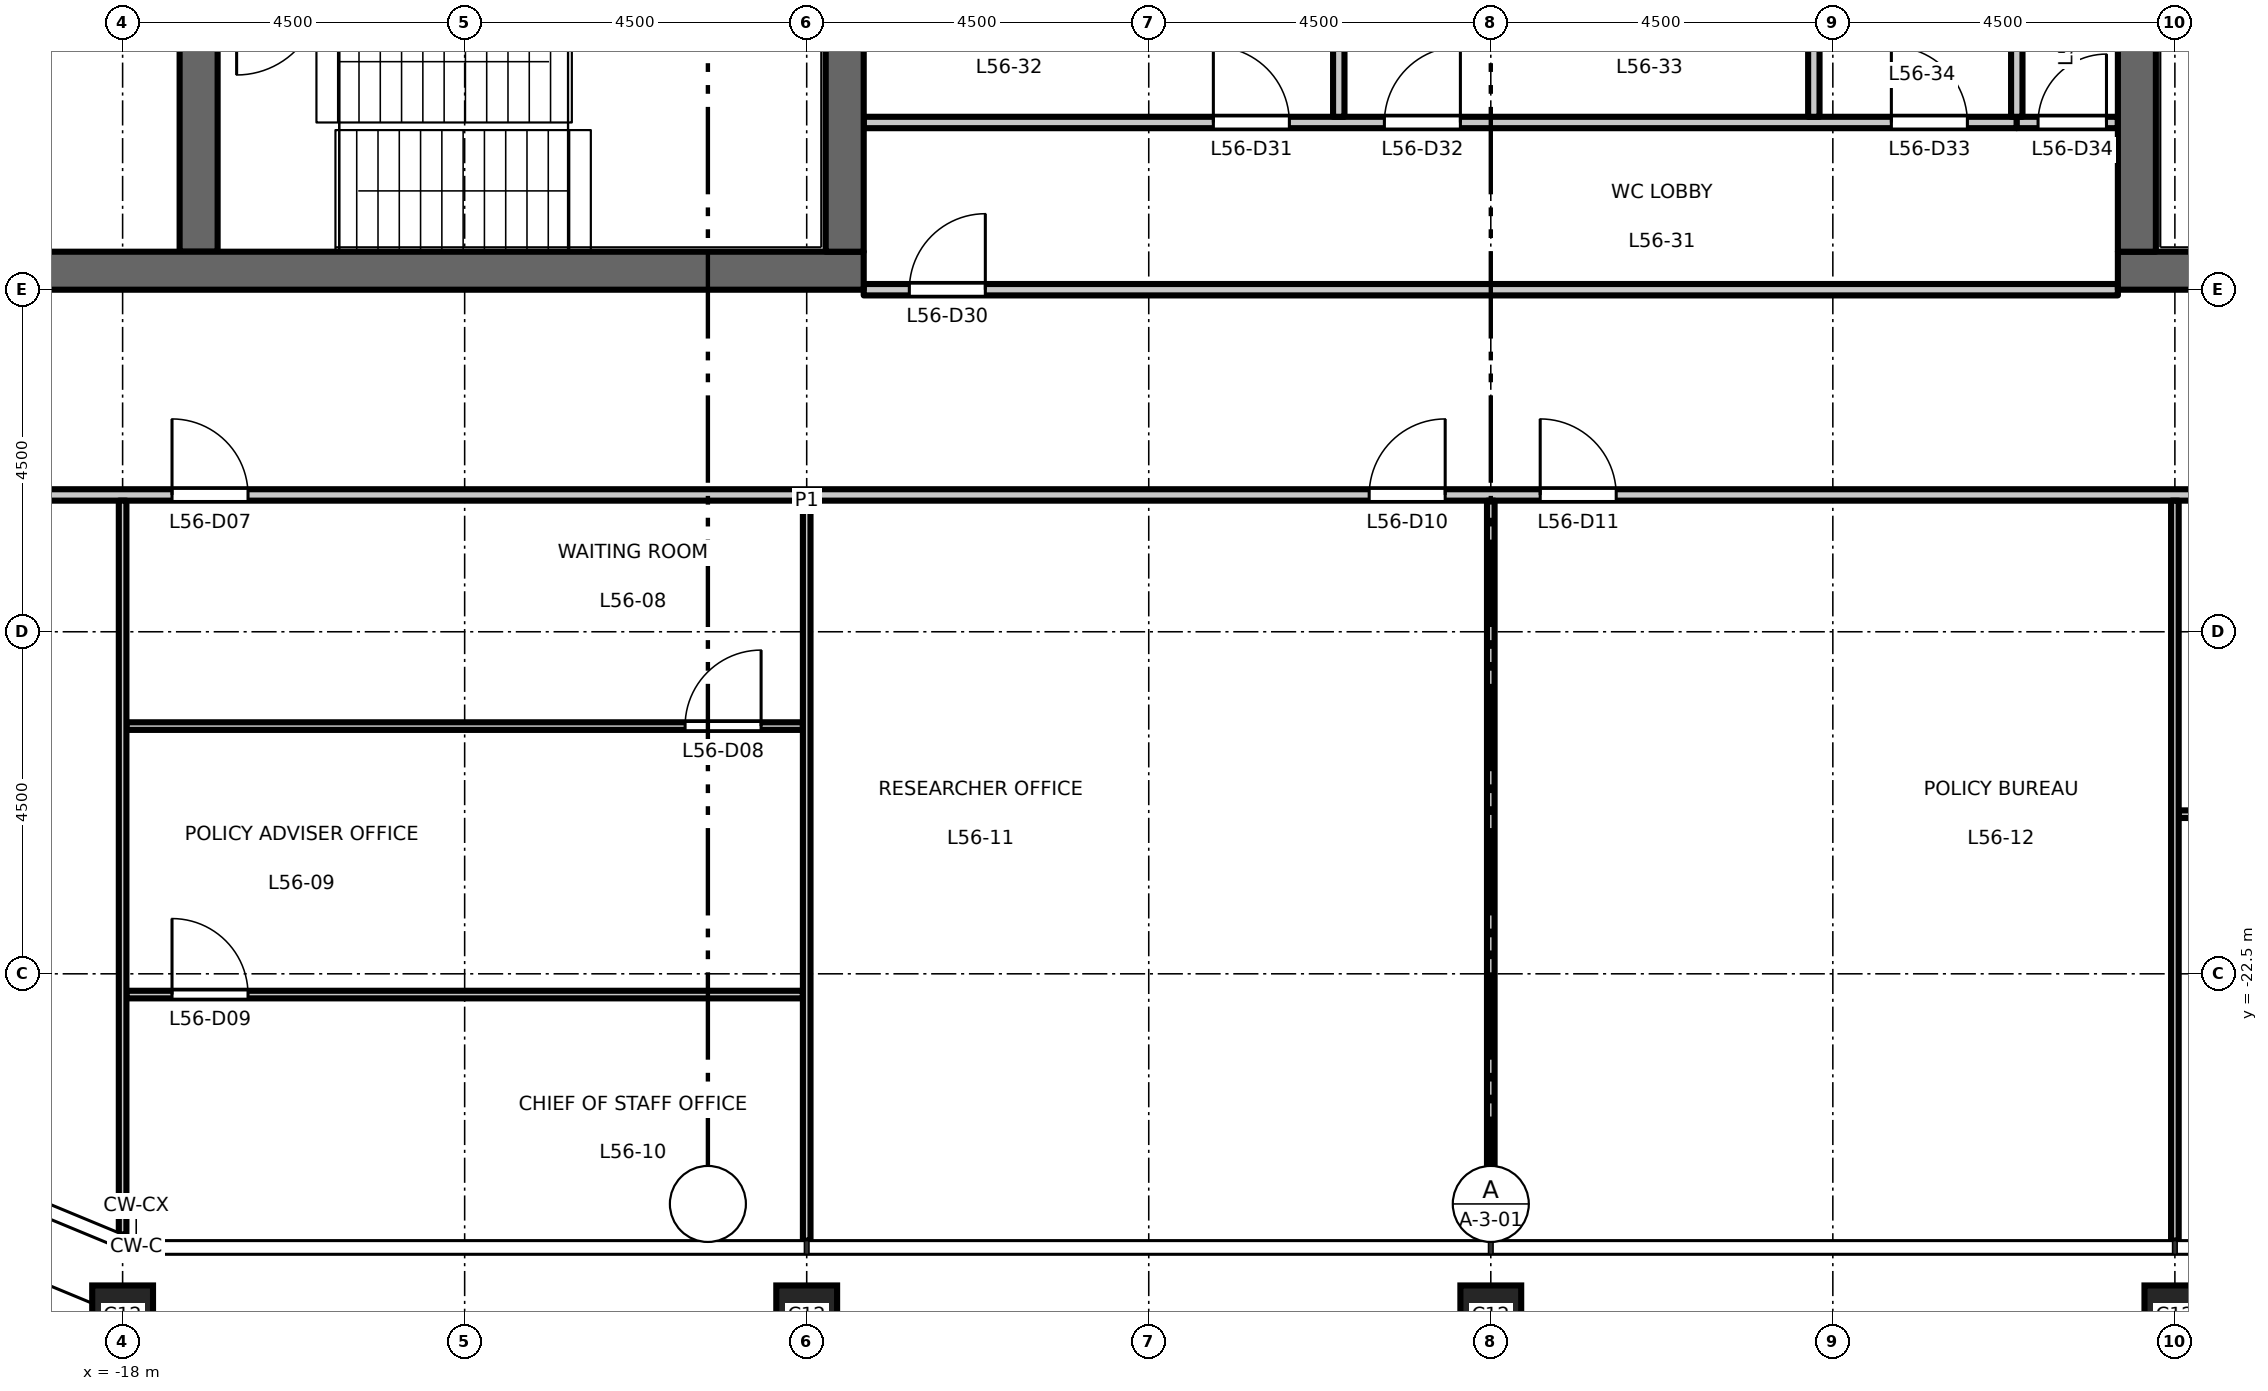
"""IFC4 building model, lengths in metres.
Left out: names, types, materials, properties, quantities, classifications, styles, units other than length and angle.
Written with IfcOpenShell. Run it as: python <this file> out.ifc"""

import sys

from ifc_helpers import new_model, si_unit, direction, frame, frame_2d, origin, origin_2d, place, context, subcontext, project, spatial, rectangle, hollow_rectangle, extrude, element, fill, save


model = new_model("IFC4")
c1 = context("Model", 3, precision=1e-05, world=origin(), true_north=direction((0.0, 1.0)))
c2 = subcontext(c1, "Body", "Model", "MODEL_VIEW")
j1 = project(units=[si_unit("LENGTHUNIT", "METRE"), si_unit("PLANEANGLEUNIT", "RADIAN")], contexts=[c1])
p1 = place(None, origin())
s1 = spatial("IfcSite", under=j1, at=p1, CompositionType="ELEMENT")
p2 = place(p1, origin())
s2 = spatial("IfcBuilding", under=s1, at=p2, CompositionType="ELEMENT")
p3 = place(p2, frame((0.0, 0.0, 260.2)))
s3 = spatial("IfcBuildingStorey", under=s2, at=p3, CompositionType="ELEMENT", Elevation=260.2)
for number, where, z_axis, x_axis in (
    (1, (-18.0, -27.0, 0.0), (0.0, 0.0, 1.0), (1.0, 0.0, 0.0)),
    (2, (-9.0, -27.0, 0.0), (0.0, 0.0, 1.0), (1.0, 0.0, 0.0)),
    (3, (0.0, -27.0, 0.0), (0.0, 0.0, 1.0), (1.0, 0.0, 0.0)),
    (4, (9.0, -27.0, 0.0), (0.0, 0.0, 1.0), (1.0, 0.0, 0.0)),
):
    element("IfcColumn", number, at=place(p3, frame(where, z_axis=z_axis, x_axis=x_axis)), inside=s3, PredefinedType="COLUMN", context=c2, shape_type="SweptSolid", body=[
        extrude(hollow_rectangle(XDim=0.8, YDim=0.8, WallThickness=0.045, at=origin_2d()), origin(), (0.0, 0.0, 1.0), 4.5),
    ])
p4 = place(p3, frame((-17.0, -13.0, 0.0), z_axis=(0.0, 0.0, 1.0), x_axis=(0.0, 1.0, 0.0)))
e5 = element("IfcWall", 5, at=p4, inside=s3, PredefinedType="SHEAR", context=c2, shape_type="SweptSolid", body=[
    extrude(rectangle(XDim=6.575, YDim=0.5, at=frame_2d((3.288, 0.0))), origin(), (0.0, 0.0, 1.0), 4.35),
])
p5 = place(p3, frame((-8.25, -13.25, 0.0), z_axis=(0.0, 0.0, 1.0), x_axis=(-1.0, 0.0, 0.0)))
e6 = element("IfcWall", 6, at=p5, inside=s3, PredefinedType="SHEAR", context=c2, shape_type="SweptSolid", body=[
    extrude(rectangle(XDim=13.5, YDim=0.5, at=frame_2d((6.75, 0.0))), origin(), (0.0, 0.0, 1.0), 4.35),
])
p6 = place(p3, frame((-8.5, -13.0, 0.0), z_axis=(0.0, 0.0, 1.0), x_axis=(0.0, 1.0, 0.0)))
e7 = element("IfcWall", 7, at=p6, inside=s3, PredefinedType="SHEAR", context=c2, shape_type="SweptSolid", body=[
    extrude(rectangle(XDim=26.0, YDim=0.5, at=frame_2d((13.0, 0.0))), origin(), (0.0, 0.0, 1.0), 4.35),
])
p7 = place(p3, frame((8.25, -13.25, 0.0), z_axis=(0.0, 0.0, 1.0), x_axis=(1.0, 0.0, 0.0)))
e8 = element("IfcWall", 8, at=p7, inside=s3, PredefinedType="SHEAR", context=c2, shape_type="SweptSolid", body=[
    extrude(rectangle(XDim=13.5, YDim=0.5, at=frame_2d((6.75, 0.0))), origin(), (0.0, 0.0, 1.0), 4.35),
])
p8 = place(p3, frame((8.5, -13.0, 0.0), z_axis=(0.0, 0.0, 1.0), x_axis=(0.0, 1.0, 0.0)))
e9 = element("IfcWall", 9, at=p8, inside=s3, PredefinedType="SHEAR", context=c2, shape_type="SweptSolid", body=[
    extrude(rectangle(XDim=26.0, YDim=0.5, at=frame_2d((13.0, 0.0))), origin(), (0.0, 0.0, 1.0), 4.35),
])
p9 = place(p3, frame((-17.95, -22.773, 0.0), z_axis=(0.0, 0.0, 1.0), x_axis=(1.0, 0.0, 0.0)))
e10 = element("IfcWall", 10, at=p9, inside=s3, PredefinedType="PARTITIONING", context=c2, shape_type="SweptSolid", body=[
    extrude(rectangle(XDim=8.9, YDim=0.1, at=frame_2d((4.45, 0.0))), origin(), (0.0, 0.0, 1.0), 4.35),
])
p10 = place(p9, frame((0.6, 0.0, 0.0)))
e11 = element("IfcOpeningElement", 11, at=p10, cuts=e10, PredefinedType="OPENING", context=c2, shape_type="SweptSolid", body=[
    extrude(rectangle(XDim=1.0, YDim=2.1, at=frame_2d((0.5, 1.05))), frame((0.0, 0.06, 0.0), z_axis=(0.0, -1.0, 0.0), x_axis=(1.0, 0.0, 0.0)), (0.0, 0.0, 1.0), 0.12),
])
p11 = place(p3, frame((9.05, -20.4, 0.0), z_axis=(0.0, 0.0, 1.0), x_axis=(1.0, 0.0, 0.0)))
e12 = element("IfcWall", 12, at=p11, inside=s3, PredefinedType="PARTITIONING", context=c2, shape_type="SweptSolid", body=[
    extrude(rectangle(XDim=8.9, YDim=0.1, at=frame_2d((4.45, 0.0))), origin(), (0.0, 0.0, 1.0), 4.35),
])
p12 = place(p11, frame((2.85, 0.0, 0.0)))
e13 = element("IfcOpeningElement", 13, at=p12, cuts=e12, PredefinedType="OPENING", context=c2, shape_type="SweptSolid", body=[
    extrude(rectangle(XDim=1.0, YDim=2.1, at=frame_2d((0.5, 1.05))), frame((0.0, 0.06, 0.0), z_axis=(0.0, -1.0, 0.0), x_axis=(1.0, 0.0, 0.0)), (0.0, 0.0, 1.0), 0.12),
])
p13 = place(p3, frame((-17.95, -19.241, 0.0), z_axis=(0.0, 0.0, 1.0), x_axis=(1.0, 0.0, 0.0)))
e14 = element("IfcWall", 14, at=p13, inside=s3, PredefinedType="PARTITIONING", context=c2, shape_type="SweptSolid", body=[
    extrude(rectangle(XDim=8.9, YDim=0.1, at=frame_2d((4.45, 0.0))), origin(), (0.0, 0.0, 1.0), 4.35),
])
p14 = place(p13, frame((7.35, 0.0, 0.0)))
e15 = element("IfcOpeningElement", 15, at=p14, cuts=e14, PredefinedType="OPENING", context=c2, shape_type="SweptSolid", body=[
    extrude(rectangle(XDim=1.0, YDim=2.1, at=frame_2d((0.5, 1.05))), frame((0.0, 0.06, 0.0), z_axis=(0.0, -1.0, 0.0), x_axis=(1.0, 0.0, 0.0)), (0.0, 0.0, 1.0), 0.12),
])
p15 = place(p3, frame((-24.525, -16.2, 0.0), z_axis=(0.0, 0.0, 1.0), x_axis=(1.0, 0.0, 0.0)))
e16 = element("IfcWall", 16, at=p15, inside=s3, PredefinedType="PARTITIONING", context=c2, shape_type="SweptSolid", body=[
    extrude(rectangle(XDim=49.05, YDim=0.15, at=frame_2d((24.525, 0.0))), origin(), (0.0, 0.0, 1.0), 4.35),
])
p16 = place(p15, frame((7.175, 0.0, 0.0)))
e17 = element("IfcOpeningElement", 17, at=p16, cuts=e16, PredefinedType="OPENING", context=c2, shape_type="SweptSolid", body=[
    extrude(rectangle(XDim=1.0, YDim=2.1, at=frame_2d((0.5, 1.05))), frame((0.0, 0.085, 0.0), z_axis=(0.0, -1.0, 0.0), x_axis=(1.0, 0.0, 0.0)), (0.0, 0.0, 1.0), 0.17),
])
p17 = place(p15, frame((22.925, 0.0, 0.0)))
e18 = element("IfcOpeningElement", 18, at=p17, cuts=e16, PredefinedType="OPENING", context=c2, shape_type="SweptSolid", body=[
    extrude(rectangle(XDim=1.0, YDim=2.1, at=frame_2d((0.5, 1.05))), frame((0.0, 0.085, 0.0), z_axis=(0.0, -1.0, 0.0), x_axis=(1.0, 0.0, 0.0)), (0.0, 0.0, 1.0), 0.17),
])
p18 = place(p15, frame((25.175, 0.0, 0.0)))
e19 = element("IfcOpeningElement", 19, at=p18, cuts=e16, PredefinedType="OPENING", context=c2, shape_type="SweptSolid", body=[
    extrude(rectangle(XDim=1.0, YDim=2.1, at=frame_2d((0.5, 1.05))), frame((0.0, 0.085, 0.0), z_axis=(0.0, -1.0, 0.0), x_axis=(1.0, 0.0, 0.0)), (0.0, 0.0, 1.0), 0.17),
])
p19 = place(p15, frame((36.425, 0.0, 0.0)))
e20 = element("IfcOpeningElement", 20, at=p19, cuts=e16, PredefinedType="OPENING", context=c2, shape_type="SweptSolid", body=[
    extrude(rectangle(XDim=1.0, YDim=2.1, at=frame_2d((0.5, 1.05))), frame((0.0, 0.085, 0.0), z_axis=(0.0, -1.0, 0.0), x_axis=(1.0, 0.0, 0.0)), (0.0, 0.0, 1.0), 0.17),
])
p20 = place(p15, frame((38.675, 0.0, 0.0)))
e21 = element("IfcOpeningElement", 21, at=p20, cuts=e16, PredefinedType="OPENING", context=c2, shape_type="SweptSolid", body=[
    extrude(rectangle(XDim=1.0, YDim=2.1, at=frame_2d((0.5, 1.05))), frame((0.0, 0.085, 0.0), z_axis=(0.0, -1.0, 0.0), x_axis=(1.0, 0.0, 0.0)), (0.0, 0.0, 1.0), 0.17),
])
p21 = place(p15, frame((0.725, 0.0, 0.0)))
e22 = element("IfcOpeningElement", 22, at=p21, cuts=e16, PredefinedType="OPENING", context=c2, shape_type="SweptSolid", body=[
    extrude(rectangle(XDim=1.0, YDim=2.1, at=frame_2d((0.5, 1.05))), frame((0.0, 0.085, 0.0), z_axis=(0.0, -1.0, 0.0), x_axis=(1.0, 0.0, 0.0)), (0.0, 0.0, 1.0), 0.17),
])
p22 = place(p3, frame((-8.25, -13.5, 0.0), z_axis=(0.0, 0.0, 1.0), x_axis=(1.0, 0.0, 0.0)))
e23 = element("IfcWall", 23, at=p22, inside=s3, PredefinedType="PARTITIONING", context=c2, shape_type="SweptSolid", body=[
    extrude(rectangle(XDim=16.5, YDim=0.15, at=frame_2d((8.25, 0.0))), origin(), (0.0, 0.0, 1.0), 3.95),
])
p23 = place(p22, frame((0.6, 0.0, 0.0)))
e24 = element("IfcOpeningElement", 24, at=p23, cuts=e23, PredefinedType="OPENING", context=c2, shape_type="SweptSolid", body=[
    extrude(rectangle(XDim=1.0, YDim=2.1, at=frame_2d((0.5, 1.05))), frame((0.0, 0.085, 0.0), z_axis=(0.0, -1.0, 0.0), x_axis=(1.0, 0.0, 0.0)), (0.0, 0.0, 1.0), 0.17),
])
p24 = place(p3, frame((-8.25, -11.3, 0.0), z_axis=(0.0, 0.0, 1.0), x_axis=(1.0, 0.0, 0.0)))
e25 = element("IfcWall", 25, at=p24, inside=s3, PredefinedType="PARTITIONING", context=c2, shape_type="SweptSolid", body=[
    extrude(rectangle(XDim=15.17, YDim=0.15, at=frame_2d((7.585, 0.0))), origin(), (0.0, 0.0, 1.0), 4.35),
])
p25 = place(p24, frame((4.6, 0.0, 0.0)))
e26 = element("IfcOpeningElement", 26, at=p25, cuts=e25, PredefinedType="OPENING", context=c2, shape_type="SweptSolid", body=[
    extrude(rectangle(XDim=1.0, YDim=2.1, at=frame_2d((0.5, 1.05))), frame((0.0, 0.085, 0.0), z_axis=(0.0, -1.0, 0.0), x_axis=(1.0, 0.0, 0.0)), (0.0, 0.0, 1.0), 0.17),
])
p26 = place(p24, frame((6.85, 0.0, 0.0)))
e27 = element("IfcOpeningElement", 27, at=p26, cuts=e25, PredefinedType="OPENING", context=c2, shape_type="SweptSolid", body=[
    extrude(rectangle(XDim=1.0, YDim=2.1, at=frame_2d((0.5, 1.05))), frame((0.0, 0.085, 0.0), z_axis=(0.0, -1.0, 0.0), x_axis=(1.0, 0.0, 0.0)), (0.0, 0.0, 1.0), 0.17),
])
p27 = place(p24, frame((13.52, 0.0, 0.0)))
e28 = element("IfcOpeningElement", 28, at=p27, cuts=e25, PredefinedType="OPENING", context=c2, shape_type="SweptSolid", body=[
    extrude(rectangle(XDim=1.0, YDim=2.1, at=frame_2d((0.5, 1.05))), frame((0.0, 0.085, 0.0), z_axis=(0.0, -1.0, 0.0), x_axis=(1.0, 0.0, 0.0)), (0.0, 0.0, 1.0), 0.17),
])
p28 = place(p3, frame((6.92, -11.3, 0.0), z_axis=(0.0, 0.0, 1.0), x_axis=(1.0, 0.0, 0.0)))
e29 = element("IfcWall", 29, at=p28, inside=s3, PredefinedType="PARTITIONING", context=c2, shape_type="SweptSolid", body=[
    extrude(rectangle(XDim=1.33, YDim=0.15, at=frame_2d((0.665, 0.0))), origin(), (0.0, 0.0, 1.0), 4.35),
])
p29 = place(p28, frame((0.28, 0.0, 0.0)))
e30 = element("IfcOpeningElement", 30, at=p29, cuts=e29, PredefinedType="OPENING", context=c2, shape_type="SweptSolid", body=[
    extrude(rectangle(XDim=0.9, YDim=2.1, at=frame_2d((0.45, 1.05))), frame((0.0, 0.085, 0.0), z_axis=(0.0, -1.0, 0.0), x_axis=(1.0, 0.0, 0.0)), (0.0, 0.0, 1.0), 0.17),
])
p30 = place(p3, frame((-18.0, -25.928, 0.0), z_axis=(0.0, 0.0, 1.0), x_axis=(0.0, 1.0, 0.0)))
e31 = element("IfcWall", 31, at=p30, inside=s3, PredefinedType="PARTITIONING", context=c2, shape_type="SweptSolid", body=[
    extrude(rectangle(XDim=9.653, YDim=0.1, at=frame_2d((4.827, 0.0))), origin(), (0.0, 0.0, 1.0), 3.65),
])
p31 = place(p3, frame((-9.0, -26.01, 0.0), z_axis=(0.0, 0.0, 1.0), x_axis=(0.0, 1.0, 0.0)))
e32 = element("IfcWall", 32, at=p31, inside=s3, PredefinedType="PARTITIONING", context=c2, shape_type="SweptSolid", body=[
    extrude(rectangle(XDim=9.735, YDim=0.1, at=frame_2d((4.868, 0.0))), origin(), (0.0, 0.0, 1.0), 3.65),
])
p32 = place(p3, frame((-2.0, -11.225, 0.0), z_axis=(0.0, 0.0, 1.0), x_axis=(0.0, 1.0, 0.0)))
e33 = element("IfcWall", 33, at=p32, inside=s3, PredefinedType="PARTITIONING", context=c2, shape_type="SweptSolid", body=[
    extrude(rectangle(XDim=2.855, YDim=0.15, at=frame_2d((1.427, 0.0))), origin(), (0.0, 0.0, 1.0), 4.35),
])
p33 = place(p3, frame((0.0, -26.01, 0.0), z_axis=(0.0, 0.0, 1.0), x_axis=(0.0, 1.0, 0.0)))
e34 = element("IfcWall", 34, at=p33, inside=s3, PredefinedType="PARTITIONING", context=c2, shape_type="SweptSolid", body=[
    extrude(rectangle(XDim=9.735, YDim=0.1, at=frame_2d((4.868, 0.0))), origin(), (0.0, 0.0, 1.0), 3.55),
])
p34 = place(p3, frame((4.25, -11.225, 0.0), z_axis=(0.0, 0.0, 1.0), x_axis=(0.0, 1.0, 0.0)))
e35 = element("IfcWall", 35, at=p34, inside=s3, PredefinedType="PARTITIONING", context=c2, shape_type="SweptSolid", body=[
    extrude(rectangle(XDim=2.855, YDim=0.15, at=frame_2d((1.427, 0.0))), origin(), (0.0, 0.0, 1.0), 4.35),
])
p35 = place(p3, frame((6.92, -11.225, 0.0), z_axis=(0.0, 0.0, 1.0), x_axis=(0.0, 1.0, 0.0)))
e36 = element("IfcWall", 36, at=p35, inside=s3, PredefinedType="PARTITIONING", context=c2, shape_type="SweptSolid", body=[
    extrude(rectangle(XDim=3.196, YDim=0.15, at=frame_2d((1.598, 0.0))), origin(), (0.0, 0.0, 1.0), 4.35),
])
p36 = place(p3, frame((9.0, -26.01, 0.0), z_axis=(0.0, 0.0, 1.0), x_axis=(0.0, 1.0, 0.0)))
e37 = element("IfcWall", 37, at=p36, inside=s3, PredefinedType="PARTITIONING", context=c2, shape_type="SweptSolid", body=[
    extrude(rectangle(XDim=9.735, YDim=0.1, at=frame_2d((4.868, 0.0))), origin(), (0.0, 0.0, 1.0), 3.65),
])
p37 = place(p16, origin())
e38 = element("IfcDoor", 38, at=p37, inside=s3, OperationType="SINGLE_SWING_LEFT", PredefinedType="DOOR", context=c2, shape_type="SweptSolid", body=[
    extrude(rectangle(XDim=1.0, YDim=2.1, at=frame_2d((0.5, 1.05))), frame((0.0, 0.025, 0.0), z_axis=(0.0, -1.0, 0.0), x_axis=(1.0, 0.0, 0.0)), (0.0, 0.0, 1.0), 0.05),
])
fill(e17, e38)
p38 = place(p14, origin())
e39 = element("IfcDoor", 39, at=p38, inside=s3, OperationType="SINGLE_SWING_RIGHT", PredefinedType="DOOR", context=c2, shape_type="SweptSolid", body=[
    extrude(rectangle(XDim=1.0, YDim=2.1, at=frame_2d((0.5, 1.05))), frame((0.0, 0.025, 0.0), z_axis=(0.0, -1.0, 0.0), x_axis=(1.0, 0.0, 0.0)), (0.0, 0.0, 1.0), 0.05),
])
fill(e15, e39)
p39 = place(p10, origin())
e40 = element("IfcDoor", 40, at=p39, inside=s3, OperationType="SINGLE_SWING_LEFT", PredefinedType="DOOR", context=c2, shape_type="SweptSolid", body=[
    extrude(rectangle(XDim=1.0, YDim=2.1, at=frame_2d((0.5, 1.05))), frame((0.0, 0.025, 0.0), z_axis=(0.0, -1.0, 0.0), x_axis=(1.0, 0.0, 0.0)), (0.0, 0.0, 1.0), 0.05),
])
fill(e11, e40)
p40 = place(p17, origin())
e41 = element("IfcDoor", 41, at=p40, inside=s3, OperationType="SINGLE_SWING_RIGHT", PredefinedType="DOOR", context=c2, shape_type="SweptSolid", body=[
    extrude(rectangle(XDim=1.0, YDim=2.1, at=frame_2d((0.5, 1.05))), frame((0.0, 0.025, 0.0), z_axis=(0.0, -1.0, 0.0), x_axis=(1.0, 0.0, 0.0)), (0.0, 0.0, 1.0), 0.05),
])
fill(e18, e41)
p41 = place(p18, origin())
e42 = element("IfcDoor", 42, at=p41, inside=s3, OperationType="SINGLE_SWING_LEFT", PredefinedType="DOOR", context=c2, shape_type="SweptSolid", body=[
    extrude(rectangle(XDim=1.0, YDim=2.1, at=frame_2d((0.5, 1.05))), frame((0.0, 0.025, 0.0), z_axis=(0.0, -1.0, 0.0), x_axis=(1.0, 0.0, 0.0)), (0.0, 0.0, 1.0), 0.05),
])
fill(e19, e42)
p42 = place(p23, origin())
e43 = element("IfcDoor", 43, at=p42, inside=s3, OperationType="SINGLE_SWING_RIGHT", PredefinedType="DOOR", context=c2, shape_type="SweptSolid", body=[
    extrude(rectangle(XDim=1.0, YDim=2.1, at=frame_2d((0.5, 1.05))), frame((0.0, 0.025, 0.0), z_axis=(0.0, -1.0, 0.0), x_axis=(1.0, 0.0, 0.0)), (0.0, 0.0, 1.0), 0.05),
])
fill(e24, e43)
p43 = place(p25, origin())
e44 = element("IfcDoor", 44, at=p43, inside=s3, OperationType="SINGLE_SWING_LEFT", PredefinedType="DOOR", context=c2, shape_type="SweptSolid", body=[
    extrude(rectangle(XDim=1.0, YDim=2.1, at=frame_2d((0.5, 1.05))), frame((0.0, 0.025, 0.0), z_axis=(0.0, -1.0, 0.0), x_axis=(1.0, 0.0, 0.0)), (0.0, 0.0, 1.0), 0.05),
])
fill(e26, e44)
p44 = place(p26, origin())
e45 = element("IfcDoor", 45, at=p44, inside=s3, OperationType="SINGLE_SWING_RIGHT", PredefinedType="DOOR", context=c2, shape_type="SweptSolid", body=[
    extrude(rectangle(XDim=1.0, YDim=2.1, at=frame_2d((0.5, 1.05))), frame((0.0, 0.025, 0.0), z_axis=(0.0, -1.0, 0.0), x_axis=(1.0, 0.0, 0.0)), (0.0, 0.0, 1.0), 0.05),
])
fill(e27, e45)
p45 = place(p27, origin())
e46 = element("IfcDoor", 46, at=p45, inside=s3, OperationType="SINGLE_SWING_LEFT", PredefinedType="DOOR", context=c2, shape_type="SweptSolid", body=[
    extrude(rectangle(XDim=1.0, YDim=2.1, at=frame_2d((0.5, 1.05))), frame((0.0, 0.025, 0.0), z_axis=(0.0, -1.0, 0.0), x_axis=(1.0, 0.0, 0.0)), (0.0, 0.0, 1.0), 0.05),
])
fill(e28, e46)
p46 = place(p29, origin())
e47 = element("IfcDoor", 47, at=p46, inside=s3, OperationType="SINGLE_SWING_RIGHT", PredefinedType="DOOR", context=c2, shape_type="SweptSolid", body=[
    extrude(rectangle(XDim=0.9, YDim=2.1, at=frame_2d((0.45, 1.05))), frame((0.0, 0.025, 0.0), z_axis=(0.0, -1.0, 0.0), x_axis=(1.0, 0.0, 0.0)), (0.0, 0.0, 1.0), 0.05),
])
fill(e30, e47)
save(model, sys.argv[1])
